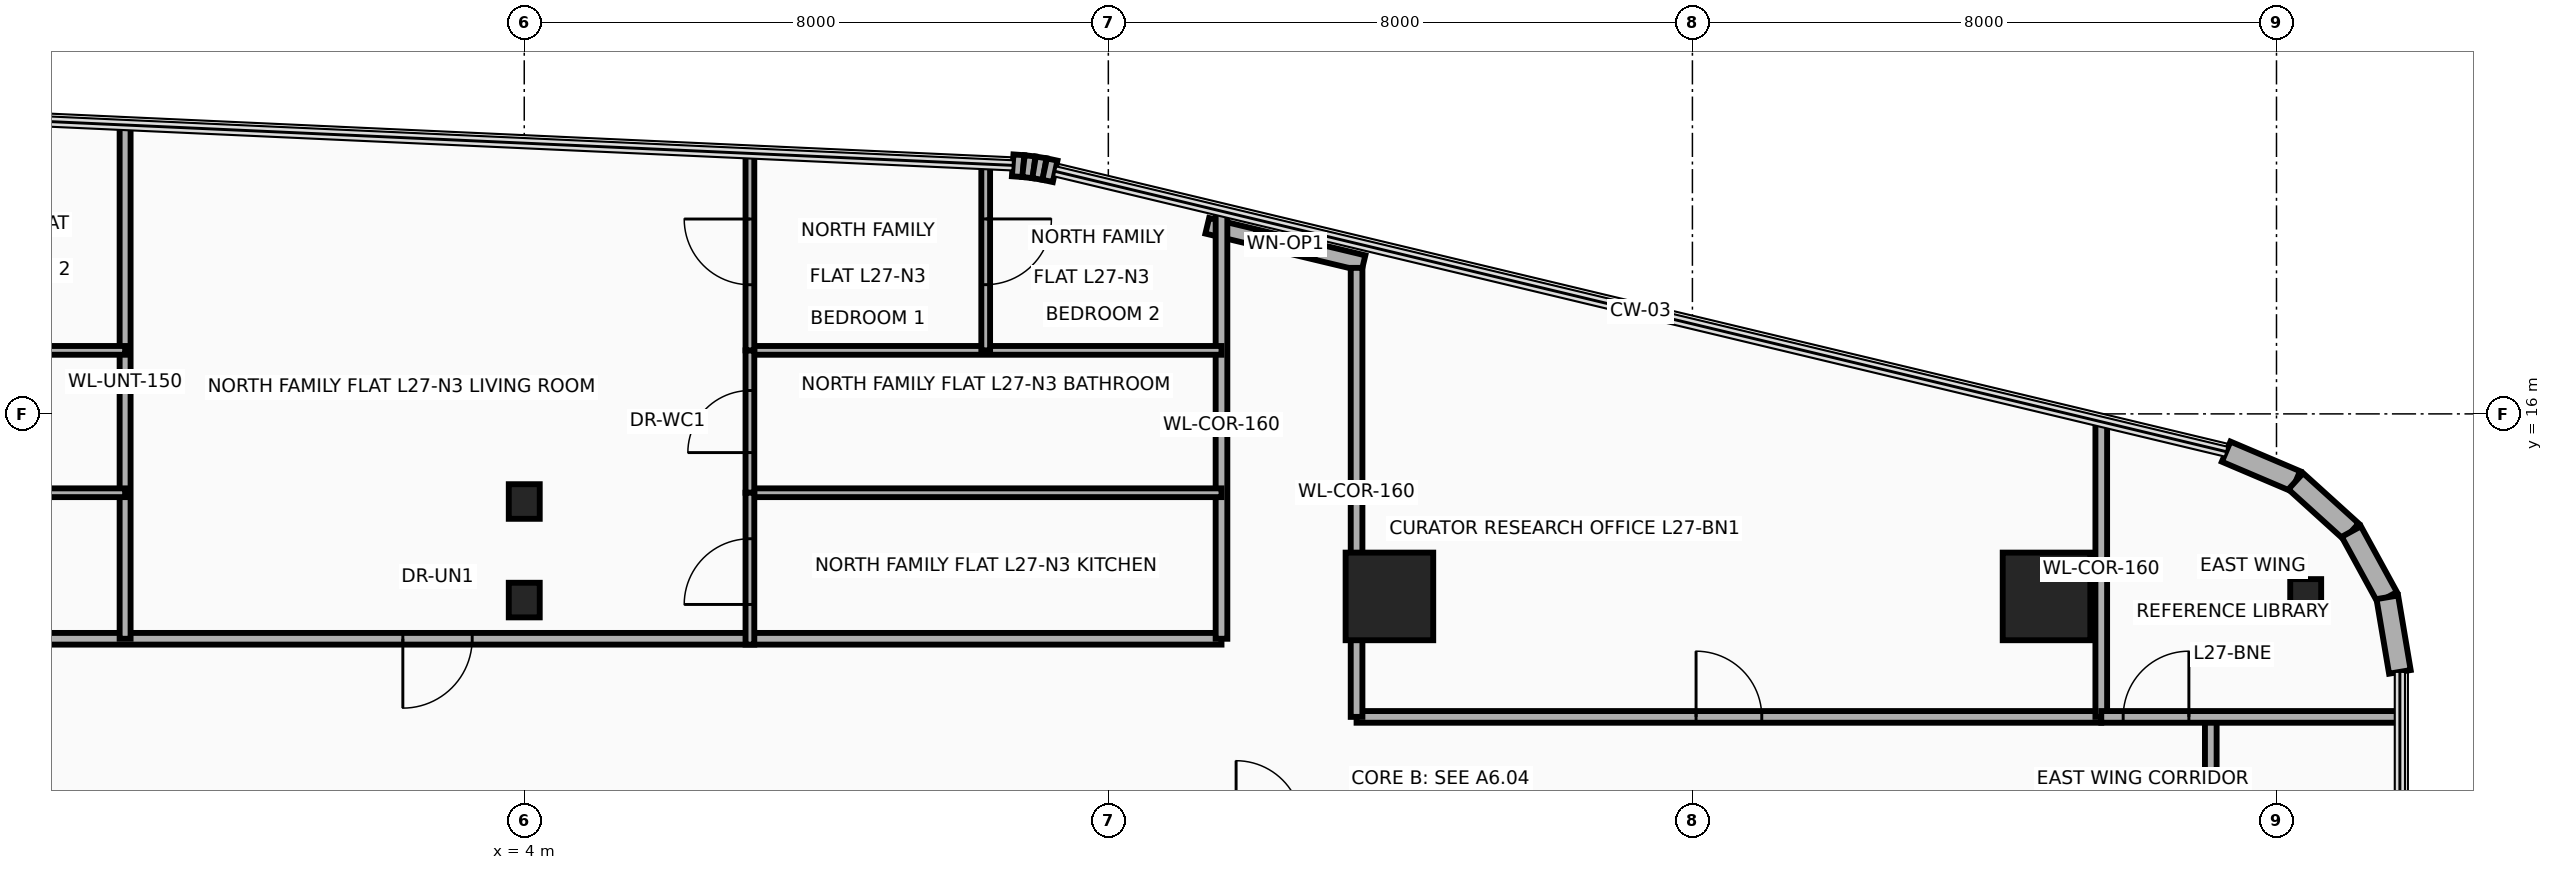
"""IFC4 building model, lengths in metres.
Left out: names, types, materials, properties, quantities, classifications, styles, units other than length and angle.
Written with IfcOpenShell. Run it as: python <this file> out.ifc"""

import sys

from ifc_helpers import new_model, si_unit, direction, frame, frame_2d, origin, origin_2d, place, context, subcontext, project, spatial, rectangle, i_section, extrude, source, transform, mapped, element, fill, save


model = new_model("IFC4")
c1 = context("Model", 3, precision=1e-05, world=origin(), true_north=direction((0.0, 1.0)))
c2 = subcontext(c1, "Body", "Model", "MODEL_VIEW")
j1 = project(units=[si_unit("LENGTHUNIT", "METRE"), si_unit("PLANEANGLEUNIT", "RADIAN")], contexts=[c1])
p1 = place(None, origin())
s1 = spatial("IfcSite", under=j1, at=p1, CompositionType="ELEMENT")
p2 = place(p1, origin())
s2 = spatial("IfcBuilding", under=s1, at=p2, CompositionType="ELEMENT")
p3 = place(p2, frame((0.0, 0.0, 109.4)))
s3 = spatial("IfcBuildingStorey", under=s2, at=p3, CompositionType="ELEMENT", Elevation=109.4)
m1 = source(origin(), c2, "Body", "SweptSolid", [
    extrude(rectangle(XDim=1.2, YDim=1.2, at=origin_2d()), origin(), (0.0, 0.0, 1.0), 3.7),
])
for number, where, z_axis, x_axis in (
    (1, (15.85, 13.5, 0.0), (0.0, 0.0, 1.0), (1.0, 0.0, 0.0)),
    (2, (24.85, 13.5, 0.0), (0.0, 0.0, 1.0), (1.0, 0.0, 0.0)),
):
    element("IfcColumn", number, at=place(p3, frame(where, z_axis=z_axis, x_axis=x_axis)), inside=s3, PredefinedType="COLUMN", context=c2, shape_type="MappedRepresentation", body=[
        mapped(m1, transform((0.0, 0.0, 0.0), x_axis=(1.0, 0.0, 0.0), y_axis=(0.0, 1.0, 0.0), z_axis=(0.0, 0.0, 1.0), scale=1.0)),
    ])
m2 = source(origin(), c2, "Body", "SweptSolid", [
    extrude(i_section(OverallWidth=0.424, OverallDepth=0.474, WebThickness=0.048, FlangeThickness=0.077, at=origin_2d()), origin(), (0.0, 0.0, 1.0), 3.7),
])
for number, where, z_axis, x_axis in (
    (3, (28.4, 13.5, 0.0), (0.0, 0.0, 1.0), (1.0, 0.0, 0.0)),
    (4, (4.0, 13.45, 0.0), (0.0, 0.0, 1.0), (1.0, 0.0, 0.0)),
    (5, (4.0, 14.8, 0.0), (0.0, 0.0, 1.0), (1.0, 0.0, 0.0)),
):
    element("IfcColumn", number, at=place(p3, frame(where, z_axis=z_axis, x_axis=x_axis)), inside=s3, PredefinedType="COLUMN", context=c2, shape_type="MappedRepresentation", body=[
        mapped(m2, transform((0.0, 0.0, 0.0), x_axis=(1.0, 0.0, 0.0), y_axis=(0.0, 1.0, 0.0), z_axis=(0.0, 0.0, 1.0), scale=1.0)),
    ])
p4 = place(p3, frame((10.69, 19.404, 0.0), z_axis=(0.0, 0.0, 1.0), x_axis=(0.99758310784, -0.069483400546, 0.0)))
e6 = element("IfcWall", 6, at=p4, inside=s3, PredefinedType="SOLIDWALL", context=c2, shape_type="SweptSolid", body=[
    extrude(rectangle(XDim=0.147, YDim=0.3, at=frame_2d((0.074, 0.0))), origin(), (0.0, 0.0, 1.0), 3.46),
])
for number, where, z_axis, x_axis in (
    (7, (10.837, 19.394, 0.0), (0.0, 0.0, 1.0), (0.993, -0.117, 0.0)),
    (8, (10.983, 19.377, 0.0), (0.0, 0.0, 1.0), (0.987, -0.163, 0.0)),
):
    element("IfcWall", number, at=place(p3, frame(where, z_axis=z_axis, x_axis=x_axis)), inside=s3, PredefinedType="SOLIDWALL", context=c2, shape_type="SweptSolid", body=[
        extrude(rectangle(XDim=0.146, YDim=0.3, at=frame_2d((0.073, 0.0))), origin(), (0.0, 0.0, 1.0), 3.46),
    ])
p5 = place(p3, frame((11.127, 19.353, 0.0), z_axis=(0.0, 0.0, 1.0), x_axis=(0.978019841688, -0.208511844421, 0.0)))
e9 = element("IfcWall", 9, at=p5, inside=s3, PredefinedType="SOLIDWALL", context=c2, shape_type="SweptSolid", body=[
    extrude(rectangle(XDim=0.147, YDim=0.3, at=frame_2d((0.074, 0.0))), origin(), (0.0, 0.0, 1.0), 3.46),
])
p6 = place(p3, frame((13.355, 18.576, 0.0), z_axis=(0.0, 0.0, 1.0), x_axis=(0.97252211384, -0.232810519721, 0.0)))
e10 = element("IfcWall", 10, at=p6, inside=s3, PredefinedType="SOLIDWALL", context=c2, shape_type="SweptSolid", body=[
    extrude(rectangle(XDim=2.2, YDim=0.22, at=frame_2d((1.1, 0.0))), origin(), (0.0, 0.0, 1.0), 3.46),
])
p7 = place(p6, frame((0.65, 0.0, 0.95)))
e11 = element("IfcOpeningElement", 11, at=p7, cuts=e10, PredefinedType="OPENING", context=c2, shape_type="SweptSolid", body=[
    extrude(rectangle(XDim=0.9, YDim=1.3, at=frame_2d((0.45, 0.65))), frame((0.0, 0.125, 0.0), z_axis=(0.0, -1.0, 0.0), x_axis=(1.0, 0.0, 0.0)), (0.0, 0.0, 1.0), 0.25),
])
p8 = place(p3, frame((27.31, 15.483, 0.0), z_axis=(0.0, 0.0, 1.0), x_axis=(0.920250328759, -0.391330208927, 0.0)))
e12 = element("IfcWall", 12, at=p8, inside=s3, PredefinedType="SOLIDWALL", context=c2, shape_type="SweptSolid", body=[
    extrude(rectangle(XDim=1.036, YDim=0.3, at=frame_2d((0.518, 0.0))), origin(), (0.0, 0.0, 1.0), 3.46),
])
p9 = place(p3, frame((28.264, 15.077, 0.0), z_axis=(0.0, 0.0, 1.0), x_axis=(0.741208839713, -0.671274501178, 0.0)))
e13 = element("IfcWall", 13, at=p9, inside=s3, PredefinedType="SOLIDWALL", context=c2, shape_type="SweptSolid", body=[
    extrude(rectangle(XDim=1.026, YDim=0.3, at=frame_2d((0.513, 0.0))), origin(), (0.0, 0.0, 1.0), 3.46),
])
p10 = place(p3, frame((29.025, 14.388, 0.0), z_axis=(0.0, 0.0, 1.0), x_axis=(0.480284137298, -0.87711296163, 0.0)))
e14 = element("IfcWall", 14, at=p10, inside=s3, PredefinedType="SOLIDWALL", context=c2, shape_type="SweptSolid", body=[
    extrude(rectangle(XDim=1.027, YDim=0.3, at=frame_2d((0.513, 0.0))), origin(), (0.0, 0.0, 1.0), 3.46),
])
p11 = place(p3, frame((29.518, 13.488, 0.0), z_axis=(0.0, 0.0, 1.0), x_axis=(0.166156796952, -0.986099345313, 0.0)))
e15 = element("IfcWall", 15, at=p11, inside=s3, PredefinedType="SOLIDWALL", context=c2, shape_type="SweptSolid", body=[
    extrude(rectangle(XDim=1.036, YDim=0.3, at=frame_2d((0.518, 0.0))), origin(), (0.0, 0.0, 1.0), 3.46),
])
p12 = place(p3, frame((-28.25, 12.92, 0.0), z_axis=(0.0, 0.0, 1.0), x_axis=(1.0, 0.0, 0.0)))
e16 = element("IfcWall", 16, at=p12, inside=s3, PredefinedType="PARTITIONING", context=c2, shape_type="SweptSolid", body=[
    extrude(rectangle(XDim=41.8, YDim=0.16, at=frame_2d((20.9, 0.0))), origin(), (0.0, 0.0, 1.0), 2.666),
])
p13 = place(p12, frame((1.456, 0.0, 0.0)))
e17 = element("IfcOpeningElement", 17, at=p13, cuts=e16, PredefinedType="OPENING", context=c2, shape_type="SweptSolid", body=[
    extrude(rectangle(XDim=0.95, YDim=2.15, at=frame_2d((0.475, 1.075))), frame((0.0, 0.095, 0.0), z_axis=(0.0, -1.0, 0.0), x_axis=(1.0, 0.0, 0.0)), (0.0, 0.0, 1.0), 0.19),
])
p14 = place(p12, frame((14.167, 0.0, 0.0)))
e18 = element("IfcOpeningElement", 18, at=p14, cuts=e16, PredefinedType="OPENING", context=c2, shape_type="SweptSolid", body=[
    extrude(rectangle(XDim=0.95, YDim=2.15, at=frame_2d((0.475, 1.075))), frame((0.0, 0.095, 0.0), z_axis=(0.0, -1.0, 0.0), x_axis=(1.0, 0.0, 0.0)), (0.0, 0.0, 1.0), 0.19),
])
p15 = place(p12, frame((30.587, 0.0, 0.0)))
e19 = element("IfcOpeningElement", 19, at=p15, cuts=e16, PredefinedType="OPENING", context=c2, shape_type="SweptSolid", body=[
    extrude(rectangle(XDim=0.95, YDim=2.15, at=frame_2d((0.475, 1.075))), frame((0.0, 0.095, 0.0), z_axis=(0.0, -1.0, 0.0), x_axis=(1.0, 0.0, 0.0)), (0.0, 0.0, 1.0), 0.19),
])
p16 = place(p3, frame((13.55, 12.92, 0.0), z_axis=(0.0, 0.0, 1.0), x_axis=(0.0, 1.0, 0.0)))
e20 = element("IfcWall", 20, at=p16, inside=s3, PredefinedType="PARTITIONING", context=c2, shape_type="SweptSolid", body=[
    extrude(rectangle(XDim=5.857, YDim=0.16, at=frame_2d((2.928, 0.0))), origin(), (0.0, 0.0, 1.0), 2.666),
])
p17 = place(p3, frame((-1.467, 12.92, 0.0), z_axis=(0.0, 0.0, 1.0), x_axis=(0.0, 1.0, 0.0)))
e21 = element("IfcWall", 21, at=p17, inside=s3, PredefinedType="PARTITIONING", context=c2, shape_type="SweptSolid", body=[
    extrude(rectangle(XDim=7.037, YDim=0.15, at=frame_2d((3.518, 0.0))), origin(), (0.0, 0.0, 1.0), 2.666),
])
p18 = place(p3, frame((-9.576, 14.92, 0.0), z_axis=(0.0, 0.0, 1.0), x_axis=(1.0, 0.0, 0.0)))
e22 = element("IfcWall", 22, at=p18, inside=s3, PredefinedType="PARTITIONING", context=c2, shape_type="SweptSolid", body=[
    extrude(rectangle(XDim=8.109, YDim=0.12, at=frame_2d((4.054, 0.0))), origin(), (0.0, 0.0, 1.0), 2.666),
])
p19 = place(p3, frame((-9.576, 16.87, 0.0), z_axis=(0.0, 0.0, 1.0), x_axis=(1.0, 0.0, 0.0)))
e23 = element("IfcWall", 23, at=p19, inside=s3, PredefinedType="PARTITIONING", context=c2, shape_type="SweptSolid", body=[
    extrude(rectangle(XDim=8.109, YDim=0.12, at=frame_2d((4.054, 0.0))), origin(), (0.0, 0.0, 1.0), 3.46),
])
for number, where, z_axis, x_axis in (
    (24, (7.091, 14.92, 0.0), (0.0, 0.0, 1.0), (1.0, 0.0, 0.0)),
    (25, (7.091, 16.87, 0.0), (0.0, 0.0, 1.0), (1.0, 0.0, 0.0)),
):
    element("IfcWall", number, at=place(p3, frame(where, z_axis=z_axis, x_axis=x_axis)), inside=s3, PredefinedType="PARTITIONING", context=c2, shape_type="SweptSolid", body=[
        extrude(rectangle(XDim=6.459, YDim=0.12, at=frame_2d((3.229, 0.0))), origin(), (0.0, 0.0, 1.0), 3.46),
    ])
p20 = place(p3, frame((7.091, 14.92, 0.0), z_axis=(0.0, 0.0, 1.0), x_axis=(0.0, 1.0, 0.0)))
e26 = element("IfcWall", 26, at=p20, inside=s3, PredefinedType="PARTITIONING", context=c2, shape_type="SweptSolid", body=[
    extrude(rectangle(XDim=1.95, YDim=0.12, at=frame_2d((0.975, 0.0))), origin(), (0.0, 0.0, 1.0), 3.46),
])
p21 = place(p20, frame((0.55, 0.0, 0.0)))
e27 = element("IfcOpeningElement", 27, at=p21, cuts=e26, PredefinedType="OPENING", context=c2, shape_type="SweptSolid", body=[
    extrude(rectangle(XDim=0.85, YDim=2.1, at=frame_2d((0.425, 1.05))), frame((0.0, 0.075, 0.0), z_axis=(0.0, -1.0, 0.0), x_axis=(1.0, 0.0, 0.0)), (0.0, 0.0, 1.0), 0.15),
])
p22 = place(p3, frame((7.091, 12.84, 0.0), z_axis=(0.0, 0.0, 1.0), x_axis=(0.0, 1.0, 0.0)))
e28 = element("IfcWall", 28, at=p22, inside=s3, PredefinedType="PARTITIONING", context=c2, shape_type="SweptSolid", body=[
    extrude(rectangle(XDim=2.08, YDim=0.12, at=frame_2d((1.04, 0.0))), origin(), (0.0, 0.0, 1.0), 2.666),
])
p23 = place(p22, frame((0.55, 0.0, 0.0)))
e29 = element("IfcOpeningElement", 29, at=p23, cuts=e28, PredefinedType="OPENING", context=c2, shape_type="SweptSolid", body=[
    extrude(rectangle(XDim=0.9, YDim=2.1, at=frame_2d((0.45, 1.05))), frame((0.0, 0.075, 0.0), z_axis=(0.0, -1.0, 0.0), x_axis=(1.0, 0.0, 0.0)), (0.0, 0.0, 1.0), 0.15),
])
p24 = place(p3, frame((7.091, 16.87, 0.0), z_axis=(0.0, 0.0, 1.0), x_axis=(0.0, 1.0, 0.0)))
e30 = element("IfcWall", 30, at=p24, inside=s3, PredefinedType="PARTITIONING", context=c2, shape_type="SweptSolid", body=[
    extrude(rectangle(XDim=2.698, YDim=0.12, at=frame_2d((1.349, 0.0))), origin(), (0.0, 0.0, 1.0), 3.46),
])
p25 = place(p24, frame((0.899, 0.0, 0.0)))
e31 = element("IfcOpeningElement", 31, at=p25, cuts=e30, PredefinedType="OPENING", context=c2, shape_type="SweptSolid", body=[
    extrude(rectangle(XDim=0.9, YDim=2.1, at=frame_2d((0.45, 1.05))), frame((0.0, 0.075, 0.0), z_axis=(0.0, -1.0, 0.0), x_axis=(1.0, 0.0, 0.0)), (0.0, 0.0, 1.0), 0.15),
])
p26 = place(p3, frame((10.32, 16.87, 0.0), z_axis=(0.0, 0.0, 1.0), x_axis=(0.0, 1.0, 0.0)))
e32 = element("IfcWall", 32, at=p26, inside=s3, PredefinedType="PARTITIONING", context=c2, shape_type="SweptSolid", body=[
    extrude(rectangle(XDim=2.551, YDim=0.12, at=frame_2d((1.275, 0.0))), origin(), (0.0, 0.0, 1.0), 3.46),
])
p27 = place(p26, frame((0.9, 0.0, 0.0)))
e33 = element("IfcOpeningElement", 33, at=p27, cuts=e32, PredefinedType="OPENING", context=c2, shape_type="SweptSolid", body=[
    extrude(rectangle(XDim=0.9, YDim=2.1, at=frame_2d((0.45, 1.05))), frame((0.0, 0.075, 0.0), z_axis=(0.0, -1.0, 0.0), x_axis=(1.0, 0.0, 0.0)), (0.0, 0.0, 1.0), 0.15),
])
p28 = place(p3, frame((15.4, 11.85, 0.0), z_axis=(0.0, 0.0, 1.0), x_axis=(1.0, 0.0, 0.0)))
e34 = element("IfcWall", 34, at=p28, inside=s3, PredefinedType="PARTITIONING", context=c2, shape_type="SweptSolid", body=[
    extrude(rectangle(XDim=10.2, YDim=0.16, at=frame_2d((5.1, 0.0))), origin(), (0.0, 0.0, 1.0), 2.834),
])
p29 = place(p28, frame((4.65, 0.0, 0.0)))
e35 = element("IfcOpeningElement", 35, at=p29, cuts=e34, PredefinedType="OPENING", context=c2, shape_type="SweptSolid", body=[
    extrude(rectangle(XDim=0.9, YDim=2.1, at=frame_2d((0.45, 1.05))), frame((0.0, 0.095, 0.0), z_axis=(0.0, -1.0, 0.0), x_axis=(1.0, 0.0, 0.0)), (0.0, 0.0, 1.0), 0.19),
])
p30 = place(p3, frame((15.4, 11.85, 0.0), z_axis=(0.0, 0.0, 1.0), x_axis=(0.0, 1.0, 0.0)))
e36 = element("IfcWall", 36, at=p30, inside=s3, PredefinedType="PARTITIONING", context=c2, shape_type="SweptSolid", body=[
    extrude(rectangle(XDim=6.15, YDim=0.16, at=frame_2d((3.075, 0.0))), origin(), (0.0, 0.0, 1.0), 2.666),
])
p31 = place(p3, frame((25.6, 11.85, 0.0), z_axis=(0.0, 0.0, 1.0), x_axis=(0.0, 1.0, 0.0)))
e37 = element("IfcWall", 37, at=p31, inside=s3, PredefinedType="PARTITIONING", context=c2, shape_type="SweptSolid", body=[
    extrude(rectangle(XDim=4.042, YDim=0.16, at=frame_2d((2.021, 0.0))), origin(), (0.0, 0.0, 1.0), 2.666),
])
p32 = place(p3, frame((27.1, -11.661, 0.0), z_axis=(0.0, 0.0, 1.0), x_axis=(0.0, 1.0, 0.0)))
e38 = element("IfcWall", 38, at=p32, inside=s3, PredefinedType="PARTITIONING", context=c2, shape_type="SweptSolid", body=[
    extrude(rectangle(XDim=23.511, YDim=0.16, at=frame_2d((11.755, 0.0))), origin(), (0.0, 0.0, 1.0), 2.666),
])
p33 = place(p32, frame((2.56, 0.0, 0.0)))
e39 = element("IfcOpeningElement", 39, at=p33, cuts=e38, PredefinedType="OPENING", context=c2, shape_type="SweptSolid", body=[
    extrude(rectangle(XDim=0.9, YDim=2.1, at=frame_2d((0.45, 1.05))), frame((0.0, 0.095, 0.0), z_axis=(0.0, -1.0, 0.0), x_axis=(1.0, 0.0, 0.0)), (0.0, 0.0, 1.0), 0.19),
])
p34 = place(p32, frame((9.451, 0.0, 0.0)))
e40 = element("IfcOpeningElement", 40, at=p34, cuts=e38, PredefinedType="OPENING", context=c2, shape_type="SweptSolid", body=[
    extrude(rectangle(XDim=1.8, YDim=2.15, at=frame_2d((0.9, 1.075))), frame((0.0, 0.095, 0.0), z_axis=(0.0, -1.0, 0.0), x_axis=(1.0, 0.0, 0.0)), (0.0, 0.0, 1.0), 0.19),
])
p35 = place(p32, frame((18.136, 0.0, 0.0)))
e41 = element("IfcOpeningElement", 41, at=p35, cuts=e38, PredefinedType="OPENING", context=c2, shape_type="SweptSolid", body=[
    extrude(rectangle(XDim=1.8, YDim=2.15, at=frame_2d((0.9, 1.075))), frame((0.0, 0.095, 0.0), z_axis=(0.0, -1.0, 0.0), x_axis=(1.0, 0.0, 0.0)), (0.0, 0.0, 1.0), 0.19),
])
p36 = place(p3, frame((25.6, 11.85, 0.0), z_axis=(0.0, 0.0, 1.0), x_axis=(1.0, 0.0, 0.0)))
e42 = element("IfcWall", 42, at=p36, inside=s3, PredefinedType="PARTITIONING", context=c2, shape_type="SweptSolid", body=[
    extrude(rectangle(XDim=4.09, YDim=0.16, at=frame_2d((2.045, 0.0))), origin(), (0.0, 0.0, 1.0), 2.896),
])
p37 = place(p36, frame((0.3, 0.0, 0.0)))
e43 = element("IfcOpeningElement", 43, at=p37, cuts=e42, PredefinedType="OPENING", context=c2, shape_type="SweptSolid", body=[
    extrude(rectangle(XDim=0.9, YDim=2.1, at=frame_2d((0.45, 1.05))), frame((0.0, 0.095, 0.0), z_axis=(0.0, -1.0, 0.0), x_axis=(1.0, 0.0, 0.0)), (0.0, 0.0, 1.0), 0.19),
])
p38 = place(p7, origin())
e44 = element("IfcWindow", 44, at=p38, inside=s3, PartitioningType="SINGLE_PANEL", PredefinedType="WINDOW", context=c2, shape_type="SweptSolid", body=[
    extrude(rectangle(XDim=0.9, YDim=1.3, at=frame_2d((0.45, 0.65))), frame((0.0, 0.03, 0.0), z_axis=(0.0, -1.0, 0.0), x_axis=(1.0, 0.0, 0.0)), (0.0, 0.0, 1.0), 0.06),
])
fill(e11, e44)
p39 = place(p15, frame((0.95, 0.0, 0.0), z_axis=(0.0, 0.0, 1.0), x_axis=(-1.0, 0.0, 0.0)))
e45 = element("IfcDoor", 45, at=p39, inside=s3, OperationType="SINGLE_SWING_LEFT", PredefinedType="DOOR", context=c2, shape_type="SweptSolid", body=[
    extrude(rectangle(XDim=0.95, YDim=2.15, at=frame_2d((0.475, 1.075))), frame((0.0, 0.025, 0.0), z_axis=(0.0, -1.0, 0.0), x_axis=(1.0, 0.0, 0.0)), (0.0, 0.0, 1.0), 0.05),
])
fill(e19, e45)
p40 = place(p21, origin())
e46 = element("IfcDoor", 46, at=p40, inside=s3, OperationType="SINGLE_SWING_RIGHT", PredefinedType="DOOR", context=c2, shape_type="SweptSolid", body=[
    extrude(rectangle(XDim=0.85, YDim=2.1, at=frame_2d((0.425, 1.05))), frame((0.0, 0.025, 0.0), z_axis=(0.0, -1.0, 0.0), x_axis=(1.0, 0.0, 0.0)), (0.0, 0.0, 1.0), 0.05),
])
fill(e27, e46)
p41 = place(p23, origin())
e47 = element("IfcDoor", 47, at=p41, inside=s3, OperationType="SINGLE_SWING_LEFT", PredefinedType="DOOR", context=c2, shape_type="SweptSolid", body=[
    extrude(rectangle(XDim=0.9, YDim=2.1, at=frame_2d((0.45, 1.05))), frame((0.0, 0.025, 0.0), z_axis=(0.0, -1.0, 0.0), x_axis=(1.0, 0.0, 0.0)), (0.0, 0.0, 1.0), 0.05),
])
fill(e29, e47)
p42 = place(p25, origin())
e48 = element("IfcDoor", 48, at=p42, inside=s3, OperationType="SINGLE_SWING_RIGHT", PredefinedType="DOOR", context=c2, shape_type="SweptSolid", body=[
    extrude(rectangle(XDim=0.9, YDim=2.1, at=frame_2d((0.45, 1.05))), frame((0.0, 0.025, 0.0), z_axis=(0.0, -1.0, 0.0), x_axis=(1.0, 0.0, 0.0)), (0.0, 0.0, 1.0), 0.05),
])
fill(e31, e48)
p43 = place(p27, frame((0.9, 0.0, 0.0), z_axis=(0.0, 0.0, 1.0), x_axis=(-1.0, 0.0, 0.0)))
e49 = element("IfcDoor", 49, at=p43, inside=s3, OperationType="SINGLE_SWING_LEFT", PredefinedType="DOOR", context=c2, shape_type="SweptSolid", body=[
    extrude(rectangle(XDim=0.9, YDim=2.1, at=frame_2d((0.45, 1.05))), frame((0.0, 0.025, 0.0), z_axis=(0.0, -1.0, 0.0), x_axis=(1.0, 0.0, 0.0)), (0.0, 0.0, 1.0), 0.05),
])
fill(e33, e49)
p44 = place(p29, origin())
e50 = element("IfcDoor", 50, at=p44, inside=s3, OperationType="SINGLE_SWING_RIGHT", PredefinedType="DOOR", context=c2, shape_type="SweptSolid", body=[
    extrude(rectangle(XDim=0.9, YDim=2.1, at=frame_2d((0.45, 1.05))), frame((0.0, 0.025, 0.0), z_axis=(0.0, -1.0, 0.0), x_axis=(1.0, 0.0, 0.0)), (0.0, 0.0, 1.0), 0.05),
])
fill(e35, e50)
p45 = place(p37, origin())
e51 = element("IfcDoor", 51, at=p45, inside=s3, OperationType="SINGLE_SWING_RIGHT", PredefinedType="DOOR", context=c2, shape_type="SweptSolid", body=[
    extrude(rectangle(XDim=0.9, YDim=2.1, at=frame_2d((0.45, 1.05))), frame((0.0, 0.025, 0.0), z_axis=(0.0, -1.0, 0.0), x_axis=(1.0, 0.0, 0.0)), (0.0, 0.0, 1.0), 0.05),
])
fill(e43, e51)
save(model, sys.argv[1])
